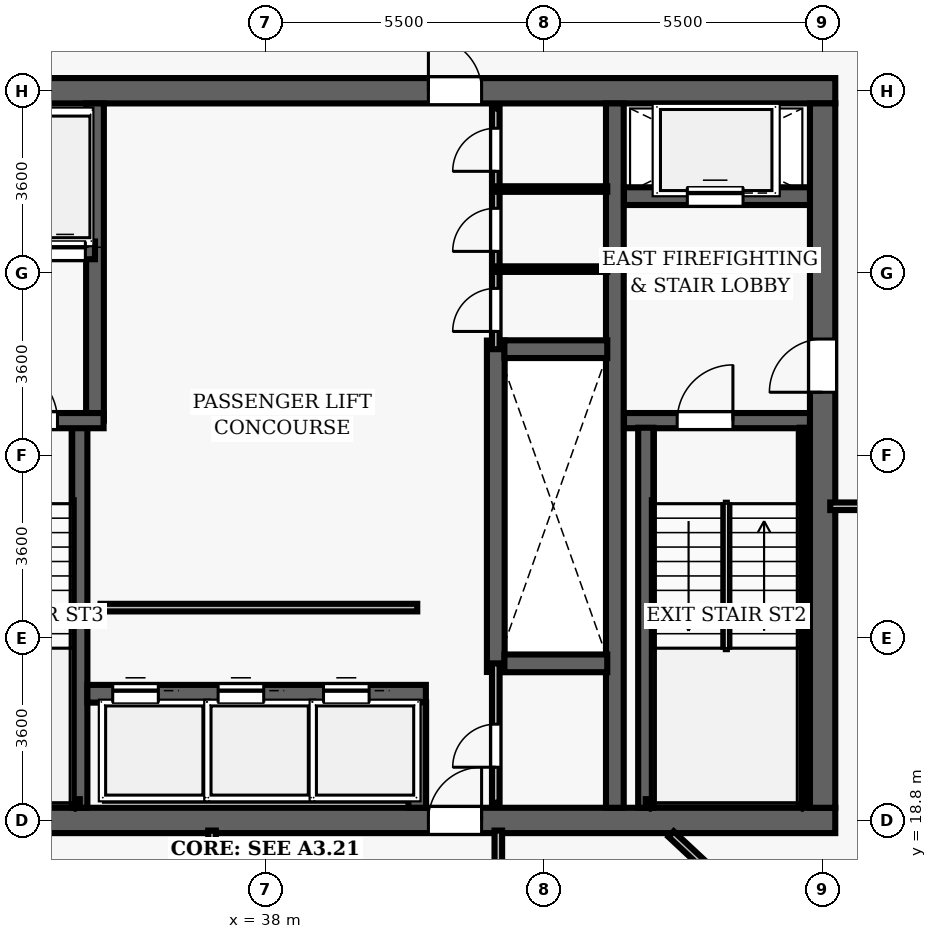
"""IFC4 building model, lengths in metres.
Left out: names, types, materials, properties, quantities, classifications, styles, units other than length and angle.
Written with IfcOpenShell. Run it as: python <this file> out.ifc"""

import sys

from ifc_helpers import new_model, si_unit, direction, frame, frame_2d, origin, place, context, subcontext, project, spatial, rectangle, extrude, element, fill, save


model = new_model("IFC4")
c1 = context("Model", 3, precision=1e-05, world=origin(), true_north=direction((0.0, 1.0)))
c2 = subcontext(c1, "Body", "Model", "MODEL_VIEW")
j1 = project(units=[si_unit("LENGTHUNIT", "METRE"), si_unit("PLANEANGLEUNIT", "RADIAN")], contexts=[c1])
p1 = place(None, origin())
s1 = spatial("IfcSite", under=j1, at=p1, CompositionType="ELEMENT")
p2 = place(p1, origin())
s2 = spatial("IfcBuilding", under=s1, at=p2, CompositionType="ELEMENT")
p3 = place(p2, frame((0.0, 0.0, 232.8)))
s3 = spatial("IfcBuildingStorey", under=s2, at=p3, CompositionType="ELEMENT", Elevation=232.8)
p4 = place(p3, frame((26.75, 18.8, 0.0), z_axis=(0.0, 0.0, 1.0), x_axis=(1.0, 0.0, 0.0)))
e1 = element("IfcWall", 1, at=p4, inside=s3, PredefinedType="SHEAR", context=c2, shape_type="SweptSolid", body=[
    extrude(rectangle(XDim=22.5, YDim=0.5, at=frame_2d((11.25, 0.0))), origin(), (0.0, 0.0, 1.0), 3.85),
])
p5 = place(p4, frame((14.47, 0.0, 0.0)))
e2 = element("IfcOpeningElement", 2, at=p5, cuts=e1, PredefinedType="OPENING", context=c2, shape_type="SweptSolid", body=[
    extrude(rectangle(XDim=1.05, YDim=2.15, at=frame_2d((0.525, 1.075))), frame((0.0, 0.26, 0.0), z_axis=(0.0, -1.0, 0.0), x_axis=(1.0, 0.0, 0.0)), (0.0, 0.0, 1.0), 0.52),
])
p6 = place(p3, frame((26.75, 33.2, 0.0), z_axis=(0.0, 0.0, 1.0), x_axis=(1.0, 0.0, 0.0)))
e3 = element("IfcWall", 3, at=p6, inside=s3, PredefinedType="SHEAR", context=c2, shape_type="SweptSolid", body=[
    extrude(rectangle(XDim=22.5, YDim=0.5, at=frame_2d((11.25, 0.0))), origin(), (0.0, 0.0, 1.0), 3.85),
])
p7 = place(p6, frame((4.57, 0.0, 0.0)))
e4 = element("IfcOpeningElement", 4, at=p7, cuts=e3, PredefinedType="OPENING", context=c2, shape_type="SweptSolid", body=[
    extrude(rectangle(XDim=1.05, YDim=2.15, at=frame_2d((0.525, 1.075))), frame((0.0, 0.26, 0.0), z_axis=(0.0, -1.0, 0.0), x_axis=(1.0, 0.0, 0.0)), (0.0, 0.0, 1.0), 0.52),
])
p8 = place(p6, frame((14.47, 0.0, 0.0)))
e5 = element("IfcOpeningElement", 5, at=p8, cuts=e3, PredefinedType="OPENING", context=c2, shape_type="SweptSolid", body=[
    extrude(rectangle(XDim=1.05, YDim=2.15, at=frame_2d((0.525, 1.075))), frame((0.0, 0.26, 0.0), z_axis=(0.0, -1.0, 0.0), x_axis=(1.0, 0.0, 0.0)), (0.0, 0.0, 1.0), 0.52),
])
p9 = place(p3, frame((49.0, 19.05, 0.0), z_axis=(0.0, 0.0, 1.0), x_axis=(0.0, 1.0, 0.0)))
e6 = element("IfcWall", 6, at=p9, inside=s3, PredefinedType="SHEAR", context=c2, shape_type="SweptSolid", body=[
    extrude(rectangle(XDim=13.9, YDim=0.5, at=frame_2d((6.95, 0.0))), origin(), (0.0, 0.0, 1.0), 3.85),
])
p10 = place(p9, frame((8.2, 0.0, 0.0)))
e7 = element("IfcOpeningElement", 7, at=p10, cuts=e6, PredefinedType="OPENING", context=c2, shape_type="SweptSolid", body=[
    extrude(rectangle(XDim=1.05, YDim=2.15, at=frame_2d((0.525, 1.075))), frame((0.0, 0.26, 0.0), z_axis=(0.0, -1.0, 0.0), x_axis=(1.0, 0.0, 0.0)), (0.0, 0.0, 1.0), 0.52),
])
p11 = place(p3, frame((44.9, 19.05, 0.0), z_axis=(0.0, 0.0, 1.0), x_axis=(0.0, 1.0, 0.0)))
e8 = element("IfcWall", 8, at=p11, inside=s3, PredefinedType="SHEAR", context=c2, shape_type="SweptSolid", body=[
    extrude(rectangle(XDim=13.9, YDim=0.35, at=frame_2d((6.95, 0.0))), origin(), (0.0, 0.0, 1.0), 3.85),
])
p12 = place(p3, frame((45.08, 26.69, 0.0), z_axis=(0.0, 0.0, 1.0), x_axis=(1.0, 0.0, 0.0)))
e9 = element("IfcWall", 9, at=p12, inside=s3, PredefinedType="SHEAR", context=c2, shape_type="SweptSolid", body=[
    extrude(rectangle(XDim=3.67, YDim=0.3, at=frame_2d((1.835, 0.0))), origin(), (0.0, 0.0, 1.0), 3.85),
])
p13 = place(p12, frame((1.05, 0.0, 0.0)))
e10 = element("IfcOpeningElement", 10, at=p13, cuts=e9, PredefinedType="OPENING", context=c2, shape_type="SweptSolid", body=[
    extrude(rectangle(XDim=1.1, YDim=2.15, at=frame_2d((0.55, 1.075))), frame((0.0, 0.16, 0.0), z_axis=(0.0, -1.0, 0.0), x_axis=(1.0, 0.0, 0.0)), (0.0, 0.0, 1.0), 0.32),
])
p14 = place(p3, frame((45.51, 19.05, 0.0), z_axis=(0.0, 0.0, 1.0), x_axis=(0.0, 1.0, 0.0)))
e11 = element("IfcWall", 11, at=p14, inside=s3, PredefinedType="SHEAR", context=c2, shape_type="SweptSolid", body=[
    extrude(rectangle(XDim=7.5, YDim=0.3, at=frame_2d((3.75, 0.0))), origin(), (0.0, 0.0, 1.0), 3.85),
])
p15 = place(p3, frame((48.605, 19.1, 0.0), z_axis=(0.0, 0.0, 1.0), x_axis=(0.0, 1.0, 0.0)))
e12 = element("IfcWall", 12, at=p15, inside=s3, PredefinedType="SHEAR", context=c2, shape_type="SweptSolid", body=[
    extrude(rectangle(XDim=7.45, YDim=0.12, at=frame_2d((3.725, 0.0))), origin(), (0.0, 0.0, 1.0), 3.85),
])
p16 = place(p3, frame((45.51, 19.16, 0.0), z_axis=(0.0, 0.0, 1.0), x_axis=(1.0, 0.0, 0.0)))
e13 = element("IfcWall", 13, at=p16, inside=s3, PredefinedType="SHEAR", context=c2, shape_type="SweptSolid", body=[
    extrude(rectangle(XDim=3.095, YDim=0.12, at=frame_2d((1.547, 0.0))), origin(), (0.0, 0.0, 1.0), 3.85),
])
p17 = place(p3, frame((45.08, 31.12, 0.0), z_axis=(0.0, 0.0, 1.0), x_axis=(1.0, 0.0, 0.0)))
e14 = element("IfcWall", 14, at=p17, inside=s3, PredefinedType="SHEAR", context=c2, shape_type="SweptSolid", body=[
    extrude(rectangle(XDim=3.67, YDim=0.35, at=frame_2d((1.835, 0.0))), origin(), (0.0, 0.0, 1.0), 2.915),
])
p18 = place(p17, frame((1.25, 0.0, 0.0)))
e15 = element("IfcOpeningElement", 15, at=p18, cuts=e14, PredefinedType="OPENING", context=c2, shape_type="SweptSolid", body=[
    extrude(rectangle(XDim=1.1, YDim=2.15, at=frame_2d((0.55, 1.075))), frame((0.0, 0.185, 0.0), z_axis=(0.0, -1.0, 0.0), x_axis=(1.0, 0.0, 0.0)), (0.0, 0.0, 1.0), 0.37),
])
p19 = place(p3, frame((34.34, 19.05, 0.0), z_axis=(0.0, 0.0, 1.0), x_axis=(0.0, 1.0, 0.0)))
e16 = element("IfcWall", 16, at=p19, inside=s3, PredefinedType="SHEAR", context=c2, shape_type="SweptSolid", body=[
    extrude(rectangle(XDim=7.5, YDim=0.3, at=frame_2d((3.75, 0.0))), origin(), (0.0, 0.0, 1.0), 3.85),
])
p20 = place(p3, frame((34.64, 26.69, 0.0), z_axis=(0.0, 0.0, 1.0), x_axis=(0.0, 1.0, 0.0)))
e17 = element("IfcWall", 17, at=p20, inside=s3, PredefinedType="SHEAR", context=c2, shape_type="SweptSolid", body=[
    extrude(rectangle(XDim=6.26, YDim=0.35, at=frame_2d((3.13, 0.0))), origin(), (0.0, 0.0, 1.0), 3.85),
])
p21 = place(p3, frame((31.25, 26.69, 0.0), z_axis=(0.0, 0.0, 1.0), x_axis=(1.0, 0.0, 0.0)))
e18 = element("IfcWall", 18, at=p21, inside=s3, PredefinedType="SHEAR", context=c2, shape_type="SweptSolid", body=[
    extrude(rectangle(XDim=3.56, YDim=0.3, at=frame_2d((1.78, 0.0))), origin(), (0.0, 0.0, 1.0), 3.85),
])
p22 = place(p21, frame((1.55, 0.0, 0.0)))
e19 = element("IfcOpeningElement", 19, at=p22, cuts=e18, PredefinedType="OPENING", context=c2, shape_type="SweptSolid", body=[
    extrude(rectangle(XDim=1.1, YDim=2.15, at=frame_2d((0.55, 1.075))), frame((0.0, 0.16, 0.0), z_axis=(0.0, -1.0, 0.0), x_axis=(1.0, 0.0, 0.0)), (0.0, 0.0, 1.0), 0.32),
])
p23 = place(p3, frame((31.3, 19.16, 0.0), z_axis=(0.0, 0.0, 1.0), x_axis=(1.0, 0.0, 0.0)))
e20 = element("IfcWall", 20, at=p23, inside=s3, PredefinedType="SHEAR", context=c2, shape_type="SweptSolid", body=[
    extrude(rectangle(XDim=3.04, YDim=0.12, at=frame_2d((1.52, 0.0))), origin(), (0.0, 0.0, 1.0), 3.85),
])
p24 = place(p3, frame((32.23, 30.05, 0.0), z_axis=(0.0, 0.0, 1.0), x_axis=(1.0, 0.0, 0.0)))
e21 = element("IfcWall", 21, at=p24, inside=s3, PredefinedType="SHEAR", context=c2, shape_type="SweptSolid", body=[
    extrude(rectangle(XDim=2.41, YDim=0.35, at=frame_2d((1.205, 0.0))), origin(), (0.0, 0.0, 1.0), 2.915),
])
p25 = place(p24, frame((0.42, 0.0, 0.0)))
e22 = element("IfcOpeningElement", 22, at=p25, cuts=e21, PredefinedType="OPENING", context=c2, shape_type="SweptSolid", body=[
    extrude(rectangle(XDim=0.8, YDim=2.15, at=frame_2d((0.4, 1.075))), frame((0.0, 0.185, 0.0), z_axis=(0.0, -1.0, 0.0), x_axis=(1.0, 0.0, 0.0)), (0.0, 0.0, 1.0), 0.37),
])
p26 = place(p24, frame((1.42, 0.0, 0.0)))
e23 = element("IfcOpeningElement", 23, at=p26, cuts=e21, PredefinedType="OPENING", context=c2, shape_type="SweptSolid", body=[
    extrude(rectangle(XDim=0.8, YDim=2.15, at=frame_2d((0.4, 1.075))), frame((0.0, 0.185, 0.0), z_axis=(0.0, -1.0, 0.0), x_axis=(1.0, 0.0, 0.0)), (0.0, 0.0, 1.0), 0.37),
])
p27 = place(p3, frame((42.55, 21.73, 0.0), z_axis=(0.0, 0.0, 1.0), x_axis=(0.0, 1.0, 0.0)))
e24 = element("IfcWall", 24, at=p27, inside=s3, PredefinedType="SHEAR", context=c2, shape_type="SweptSolid", body=[
    extrude(rectangle(XDim=6.54, YDim=0.35, at=frame_2d((3.27, 0.0))), origin(), (0.0, 0.0, 1.0), 2.915),
])
for number, where, z_axis, x_axis in (
    (25, (42.72, 21.9, 0.0), (0.0, 0.0, 1.0), (1.0, 0.0, 0.0)),
    (26, (42.72, 28.1, 0.0), (0.0, 0.0, 1.0), (1.0, 0.0, 0.0)),
):
    element("IfcWall", number, at=place(p3, frame(where, z_axis=z_axis, x_axis=x_axis)), inside=s3, PredefinedType="SHEAR", context=c2, shape_type="SweptSolid", body=[
        extrude(rectangle(XDim=2.03, YDim=0.35, at=frame_2d((1.015, 0.0))), origin(), (0.0, 0.0, 1.0), 2.915),
    ])
p28 = place(p3, frame((34.49, 21.3, 0.0), z_axis=(0.0, 0.0, 1.0), x_axis=(1.0, 0.0, 0.0)))
e27 = element("IfcWall", 27, at=p28, inside=s3, PredefinedType="SHEAR", context=c2, shape_type="SweptSolid", body=[
    extrude(rectangle(XDim=6.68, YDim=0.35, at=frame_2d((3.34, 0.0))), origin(), (0.0, 0.0, 1.0), 2.915),
])
p29 = place(p28, frame((0.5, 0.0, 0.0)))
e28 = element("IfcOpeningElement", 28, at=p29, cuts=e27, PredefinedType="OPENING", context=c2, shape_type="SweptSolid", body=[
    extrude(rectangle(XDim=0.9, YDim=2.15, at=frame_2d((0.45, 1.075))), frame((0.0, 0.185, 0.0), z_axis=(0.0, -1.0, 0.0), x_axis=(1.0, 0.0, 0.0)), (0.0, 0.0, 1.0), 0.37),
])
p30 = place(p28, frame((2.58, 0.0, 0.0)))
e29 = element("IfcOpeningElement", 29, at=p30, cuts=e27, PredefinedType="OPENING", context=c2, shape_type="SweptSolid", body=[
    extrude(rectangle(XDim=0.9, YDim=2.15, at=frame_2d((0.45, 1.075))), frame((0.0, 0.185, 0.0), z_axis=(0.0, -1.0, 0.0), x_axis=(1.0, 0.0, 0.0)), (0.0, 0.0, 1.0), 0.37),
])
p31 = place(p28, frame((4.66, 0.0, 0.0)))
e30 = element("IfcOpeningElement", 30, at=p31, cuts=e27, PredefinedType="OPENING", context=c2, shape_type="SweptSolid", body=[
    extrude(rectangle(XDim=0.9, YDim=2.15, at=frame_2d((0.45, 1.075))), frame((0.0, 0.185, 0.0), z_axis=(0.0, -1.0, 0.0), x_axis=(1.0, 0.0, 0.0)), (0.0, 0.0, 1.0), 0.37),
])
p32 = place(p3, frame((41.0, 19.05, 0.0), z_axis=(0.0, 0.0, 1.0), x_axis=(0.0, 1.0, 0.0)))
e31 = element("IfcWall", 31, at=p32, inside=s3, PredefinedType="SHEAR", context=c2, shape_type="SweptSolid", body=[
    extrude(rectangle(XDim=2.08, YDim=0.35, at=frame_2d((1.04, 0.0))), origin(), (0.0, 0.0, 1.0), 2.915),
])
p33 = place(p3, frame((34.75, 23.0, 0.0), z_axis=(0.0, 0.0, 1.0), x_axis=(1.0, 0.0, 0.0)))
e32 = element("IfcWall", 32, at=p33, inside=s3, PredefinedType="PARTITIONING", context=c2, shape_type="SweptSolid", body=[
    extrude(rectangle(XDim=6.25, YDim=0.15, at=frame_2d((3.125, 0.0))), origin(), (0.0, 0.0, 1.0), 2.915),
])
p34 = place(p3, frame((42.55, 28.1, 0.0), z_axis=(0.0, 0.0, 1.0), x_axis=(0.0, 1.0, 0.0)))
e33 = element("IfcWall", 33, at=p34, inside=s3, PredefinedType="PARTITIONING", context=c2, shape_type="SweptSolid", body=[
    extrude(rectangle(XDim=4.75, YDim=0.15, at=frame_2d((2.375, 0.0))), origin(), (0.0, 0.0, 1.0), 2.915),
])
p35 = place(p34, frame((0.35, 0.0, 0.0)))
e34 = element("IfcOpeningElement", 34, at=p35, cuts=e33, PredefinedType="OPENING", context=c2, shape_type="SweptSolid", body=[
    extrude(rectangle(XDim=0.85, YDim=2.1, at=frame_2d((0.425, 1.05))), frame((0.0, 0.085, 0.0), z_axis=(0.0, -1.0, 0.0), x_axis=(1.0, 0.0, 0.0)), (0.0, 0.0, 1.0), 0.17),
])
p36 = place(p34, frame((1.93, 0.0, 0.0)))
e35 = element("IfcOpeningElement", 35, at=p36, cuts=e33, PredefinedType="OPENING", context=c2, shape_type="SweptSolid", body=[
    extrude(rectangle(XDim=0.85, YDim=2.1, at=frame_2d((0.425, 1.05))), frame((0.0, 0.085, 0.0), z_axis=(0.0, -1.0, 0.0), x_axis=(1.0, 0.0, 0.0)), (0.0, 0.0, 1.0), 0.17),
])
p37 = place(p34, frame((3.51, 0.0, 0.0)))
e36 = element("IfcOpeningElement", 36, at=p37, cuts=e33, PredefinedType="OPENING", context=c2, shape_type="SweptSolid", body=[
    extrude(rectangle(XDim=0.85, YDim=2.1, at=frame_2d((0.425, 1.05))), frame((0.0, 0.085, 0.0), z_axis=(0.0, -1.0, 0.0), x_axis=(1.0, 0.0, 0.0)), (0.0, 0.0, 1.0), 0.17),
])
for number, where, z_axis, x_axis in (
    (37, (42.55, 29.68, 0.0), (0.0, 0.0, 1.0), (1.0, 0.0, 0.0)),
    (38, (42.55, 31.26, 0.0), (0.0, 0.0, 1.0), (1.0, 0.0, 0.0)),
):
    element("IfcWall", number, at=place(p3, frame(where, z_axis=z_axis, x_axis=x_axis)), inside=s3, PredefinedType="PARTITIONING", context=c2, shape_type="SweptSolid", body=[
        extrude(rectangle(XDim=2.2, YDim=0.11, at=frame_2d((1.1, 0.0))), origin(), (0.0, 0.0, 1.0), 2.915),
    ])
p38 = place(p3, frame((42.55, 19.15, 0.0), z_axis=(0.0, 0.0, 1.0), x_axis=(0.0, 1.0, 0.0)))
e39 = element("IfcWall", 39, at=p38, inside=s3, PredefinedType="PARTITIONING", context=c2, shape_type="SweptSolid", body=[
    extrude(rectangle(XDim=2.75, YDim=0.15, at=frame_2d((1.375, 0.0))), origin(), (0.0, 0.0, 1.0), 2.915),
])
p39 = place(p38, frame((0.7, 0.0, 0.0)))
e40 = element("IfcOpeningElement", 40, at=p39, cuts=e39, PredefinedType="OPENING", context=c2, shape_type="SweptSolid", body=[
    extrude(rectangle(XDim=0.85, YDim=2.1, at=frame_2d((0.425, 1.05))), frame((0.0, 0.085, 0.0), z_axis=(0.0, -1.0, 0.0), x_axis=(1.0, 0.0, 0.0)), (0.0, 0.0, 1.0), 0.17),
])
p40 = place(p3, frame((49.15, 25.0, 0.0), z_axis=(0.0, 0.0, 1.0), x_axis=(1.0, 0.0, 0.0)))
e41 = element("IfcWall", 41, at=p40, inside=s3, PredefinedType="PARTITIONING", context=c2, shape_type="SweptSolid", body=[
    extrude(rectangle(XDim=9.904, YDim=0.15, at=frame_2d((4.952, 0.0))), origin(), (0.0, 0.0, 1.0), 2.915),
])
p41 = place(p40, frame((2.001, 0.0, 0.0)))
e42 = element("IfcOpeningElement", 42, at=p41, cuts=e41, PredefinedType="OPENING", context=c2, shape_type="SweptSolid", body=[
    extrude(rectangle(XDim=0.95, YDim=2.15, at=frame_2d((0.475, 1.075))), frame((0.0, 0.085, 0.0), z_axis=(0.0, -1.0, 0.0), x_axis=(1.0, 0.0, 0.0)), (0.0, 0.0, 1.0), 0.17),
])
p42 = place(p3, frame((36.95, 11.2, 0.0), z_axis=(0.0, 0.0, 1.0), x_axis=(0.0, 1.0, 0.0)))
e43 = element("IfcWall", 43, at=p42, inside=s3, PredefinedType="PARTITIONING", context=c2, shape_type="SweptSolid", body=[
    extrude(rectangle(XDim=7.4, YDim=0.15, at=frame_2d((3.7, 0.0))), origin(), (0.0, 0.0, 1.0), 2.915),
])
p43 = place(p42, frame((5.075, 0.0, 0.0)))
e44 = element("IfcOpeningElement", 44, at=p43, cuts=e43, PredefinedType="OPENING", context=c2, shape_type="SweptSolid", body=[
    extrude(rectangle(XDim=0.95, YDim=2.15, at=frame_2d((0.475, 1.075))), frame((0.0, 0.085, 0.0), z_axis=(0.0, -1.0, 0.0), x_axis=(1.0, 0.0, 0.0)), (0.0, 0.0, 1.0), 0.17),
])
p44 = place(p3, frame((42.6, 16.65, 0.0), z_axis=(0.0, 0.0, 1.0), x_axis=(0.0, 1.0, 0.0)))
e45 = element("IfcWall", 45, at=p44, inside=s3, PredefinedType="PARTITIONING", context=c2, shape_type="SweptSolid", body=[
    extrude(rectangle(XDim=1.95, YDim=0.15, at=frame_2d((0.975, 0.0))), origin(), (0.0, 0.0, 1.0), 2.915),
])
p45 = place(p3, frame((46.01, 18.53, 0.0), z_axis=(0.0, 0.0, 1.0), x_axis=(0.731354089415, -0.681997944202, 0.0)))
e46 = element("IfcWall", 46, at=p45, inside=s3, PredefinedType="PARTITIONING", context=c2, shape_type="SweptSolid", body=[
    extrude(rectangle(XDim=17.14, YDim=0.15, at=frame_2d((8.57, 0.0))), origin(), (0.0, 0.0, 1.0), 2.915),
])
p46 = place(p13, origin())
e47 = element("IfcDoor", 47, at=p46, inside=s3, OperationType="SINGLE_SWING_RIGHT", PredefinedType="DOOR", context=c2, shape_type="SweptSolid", body=[
    extrude(rectangle(XDim=1.1, YDim=2.15, at=frame_2d((0.55, 1.075))), frame((0.0, 0.025, 0.0), z_axis=(0.0, -1.0, 0.0), x_axis=(1.0, 0.0, 0.0)), (0.0, 0.0, 1.0), 0.05),
])
fill(e10, e47)
p47 = place(p10, origin())
e48 = element("IfcDoor", 48, at=p47, inside=s3, OperationType="SINGLE_SWING_LEFT", PredefinedType="DOOR", context=c2, shape_type="SweptSolid", body=[
    extrude(rectangle(XDim=1.05, YDim=2.15, at=frame_2d((0.525, 1.075))), frame((0.0, 0.025, 0.0), z_axis=(0.0, -1.0, 0.0), x_axis=(1.0, 0.0, 0.0)), (0.0, 0.0, 1.0), 0.05),
])
fill(e7, e48)
p48 = place(p22, origin())
e49 = element("IfcDoor", 49, at=p48, inside=s3, OperationType="SINGLE_SWING_LEFT", PredefinedType="DOOR", context=c2, shape_type="SweptSolid", body=[
    extrude(rectangle(XDim=1.1, YDim=2.15, at=frame_2d((0.55, 1.075))), frame((0.0, 0.025, 0.0), z_axis=(0.0, -1.0, 0.0), x_axis=(1.0, 0.0, 0.0)), (0.0, 0.0, 1.0), 0.05),
])
fill(e19, e49)
p49 = place(p8, origin())
e50 = element("IfcDoor", 50, at=p49, inside=s3, OperationType="SINGLE_SWING_LEFT", PredefinedType="DOOR", context=c2, shape_type="SweptSolid", body=[
    extrude(rectangle(XDim=1.05, YDim=2.15, at=frame_2d((0.525, 1.075))), frame((0.0, 0.025, 0.0), z_axis=(0.0, -1.0, 0.0), x_axis=(1.0, 0.0, 0.0)), (0.0, 0.0, 1.0), 0.05),
])
fill(e5, e50)
p50 = place(p5, origin())
e51 = element("IfcDoor", 51, at=p50, inside=s3, OperationType="SINGLE_SWING_RIGHT", PredefinedType="DOOR", context=c2, shape_type="SweptSolid", body=[
    extrude(rectangle(XDim=1.05, YDim=2.15, at=frame_2d((0.525, 1.075))), frame((0.0, 0.025, 0.0), z_axis=(0.0, -1.0, 0.0), x_axis=(1.0, 0.0, 0.0)), (0.0, 0.0, 1.0), 0.05),
])
fill(e2, e51)
p51 = place(p35, origin())
e52 = element("IfcDoor", 52, at=p51, inside=s3, OperationType="SINGLE_SWING_LEFT", PredefinedType="DOOR", context=c2, shape_type="SweptSolid", body=[
    extrude(rectangle(XDim=0.85, YDim=2.1, at=frame_2d((0.425, 1.05))), frame((0.0, 0.025, 0.0), z_axis=(0.0, -1.0, 0.0), x_axis=(1.0, 0.0, 0.0)), (0.0, 0.0, 1.0), 0.05),
])
fill(e34, e52)
p52 = place(p36, origin())
e53 = element("IfcDoor", 53, at=p52, inside=s3, OperationType="SINGLE_SWING_LEFT", PredefinedType="DOOR", context=c2, shape_type="SweptSolid", body=[
    extrude(rectangle(XDim=0.85, YDim=2.1, at=frame_2d((0.425, 1.05))), frame((0.0, 0.025, 0.0), z_axis=(0.0, -1.0, 0.0), x_axis=(1.0, 0.0, 0.0)), (0.0, 0.0, 1.0), 0.05),
])
fill(e35, e53)
p53 = place(p37, origin())
e54 = element("IfcDoor", 54, at=p53, inside=s3, OperationType="SINGLE_SWING_LEFT", PredefinedType="DOOR", context=c2, shape_type="SweptSolid", body=[
    extrude(rectangle(XDim=0.85, YDim=2.1, at=frame_2d((0.425, 1.05))), frame((0.0, 0.025, 0.0), z_axis=(0.0, -1.0, 0.0), x_axis=(1.0, 0.0, 0.0)), (0.0, 0.0, 1.0), 0.05),
])
fill(e36, e54)
p54 = place(p39, origin())
e55 = element("IfcDoor", 55, at=p54, inside=s3, OperationType="SINGLE_SWING_LEFT", PredefinedType="DOOR", context=c2, shape_type="SweptSolid", body=[
    extrude(rectangle(XDim=0.85, YDim=2.1, at=frame_2d((0.425, 1.05))), frame((0.0, 0.025, 0.0), z_axis=(0.0, -1.0, 0.0), x_axis=(1.0, 0.0, 0.0)), (0.0, 0.0, 1.0), 0.05),
])
fill(e40, e55)
p55 = place(p29, origin())
e56 = element("IfcDoor", 56, at=p55, inside=s3, OperationType="SLIDING_TO_LEFT", PredefinedType="DOOR", context=c2, shape_type="SweptSolid", body=[
    extrude(rectangle(XDim=0.9, YDim=2.15, at=frame_2d((0.45, 1.075))), frame((0.0, 0.025, 0.0), z_axis=(0.0, -1.0, 0.0), x_axis=(1.0, 0.0, 0.0)), (0.0, 0.0, 1.0), 0.05),
])
fill(e28, e56)
p56 = place(p30, origin())
e57 = element("IfcDoor", 57, at=p56, inside=s3, OperationType="SLIDING_TO_LEFT", PredefinedType="DOOR", context=c2, shape_type="SweptSolid", body=[
    extrude(rectangle(XDim=0.9, YDim=2.15, at=frame_2d((0.45, 1.075))), frame((0.0, 0.025, 0.0), z_axis=(0.0, -1.0, 0.0), x_axis=(1.0, 0.0, 0.0)), (0.0, 0.0, 1.0), 0.05),
])
fill(e29, e57)
p57 = place(p31, origin())
e58 = element("IfcDoor", 58, at=p57, inside=s3, OperationType="SLIDING_TO_LEFT", PredefinedType="DOOR", context=c2, shape_type="SweptSolid", body=[
    extrude(rectangle(XDim=0.9, YDim=2.15, at=frame_2d((0.45, 1.075))), frame((0.0, 0.025, 0.0), z_axis=(0.0, -1.0, 0.0), x_axis=(1.0, 0.0, 0.0)), (0.0, 0.0, 1.0), 0.05),
])
fill(e30, e58)
p58 = place(p18, origin())
e59 = element("IfcDoor", 59, at=p58, inside=s3, OperationType="SLIDING_TO_LEFT", PredefinedType="DOOR", context=c2, shape_type="SweptSolid", body=[
    extrude(rectangle(XDim=1.1, YDim=2.15, at=frame_2d((0.55, 1.075))), frame((0.0, 0.025, 0.0), z_axis=(0.0, -1.0, 0.0), x_axis=(1.0, 0.0, 0.0)), (0.0, 0.0, 1.0), 0.05),
])
fill(e15, e59)
p59 = place(p26, origin())
e60 = element("IfcDoor", 60, at=p59, inside=s3, OperationType="SLIDING_TO_LEFT", PredefinedType="DOOR", context=c2, shape_type="SweptSolid", body=[
    extrude(rectangle(XDim=0.8, YDim=2.15, at=frame_2d((0.4, 1.075))), frame((0.0, 0.025, 0.0), z_axis=(0.0, -1.0, 0.0), x_axis=(1.0, 0.0, 0.0)), (0.0, 0.0, 1.0), 0.05),
])
fill(e23, e60)
save(model, sys.argv[1])
